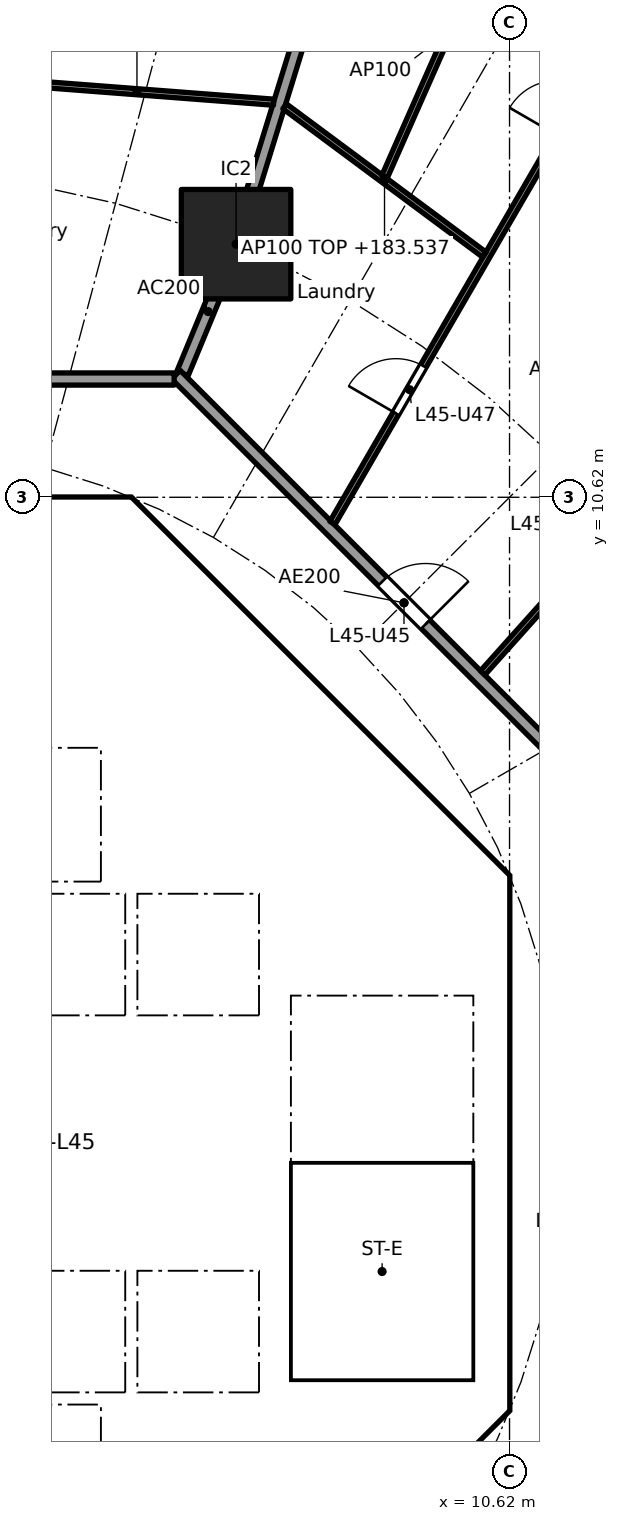
"""IFC4 building model, lengths in metres.
Left out: names, types, materials, properties, quantities, classifications, styles, units other than length and angle.
Written with IfcOpenShell. Run it as: python <this file> out.ifc"""

import sys

from ifc_helpers import new_model, si_unit, direction, frame, frame_2d, origin, origin_2d, place, context, subcontext, project, spatial, polyline, rectangle, outline, extrude, element, fill, save


model = new_model("IFC4")
c1 = context("Model", 3, precision=1e-05, world=origin(), true_north=direction((0.0, 1.0)))
c2 = subcontext(c1, "Body", "Model", "MODEL_VIEW")
j1 = project(units=[si_unit("LENGTHUNIT", "METRE"), si_unit("PLANEANGLEUNIT", "RADIAN")], contexts=[c1])
p1 = place(None, origin())
s1 = spatial("IfcSite", under=j1, at=p1, CompositionType="ELEMENT")
p2 = place(p1, origin())
s2 = spatial("IfcBuilding", under=s1, at=p2, CompositionType="ELEMENT")
p3 = place(p2, frame((0.0, 0.0, 180.7)))
s3 = spatial("IfcBuildingStorey", under=s2, at=p3, CompositionType="ELEMENT", Elevation=180.7)
p4 = place(p3, frame((6.123, 14.782, 0.0), z_axis=(0.0, 0.0, 1.0), x_axis=(1.0, 0.0, 0.0)))
e1 = element("IfcColumn", 1, at=p4, inside=s3, PredefinedType="COLUMN", context=c2, shape_type="SweptSolid", body=[
    extrude(rectangle(XDim=1.8, YDim=1.8, at=origin_2d()), origin(), (0.0, 0.0, 1.0), 3.7),
])
p5 = place(p3, frame((9.988, 4.613, 0.0), z_axis=(0.0, 0.0, 1.0), x_axis=(-0.707106781187, 0.707106781187, 0.0)))
e2 = element("IfcWall", 2, at=p5, inside=s3, PredefinedType="SHEAR", context=c2, shape_type="SweptSolid", body=[
    extrude(rectangle(XDim=7.602, YDim=0.6, at=frame_2d((3.801, 0.0))), origin(), (0.0, 0.0, 1.0), 3.44),
])
p6 = place(p5, frame((3.201, 0.0, 0.0)))
e3 = element("IfcOpeningElement", 3, at=p6, cuts=e2, PredefinedType="OPENING", context=c2, shape_type="SweptSolid", body=[
    extrude(rectangle(XDim=1.2, YDim=2.1, at=frame_2d((0.6, 1.05))), frame((0.0, 0.31, 0.0), z_axis=(0.0, -1.0, 0.0), x_axis=(1.0, 0.0, 0.0)), (0.0, 0.0, 1.0), 0.62),
])
p7 = place(p3, frame((4.613, -9.988, 0.0), z_axis=(0.0, 0.0, 1.0), x_axis=(0.707106781187, 0.707106781187, 0.0)))
e4 = element("IfcWall", 4, at=p7, inside=s3, PredefinedType="SHEAR", context=c2, shape_type="SweptSolid", body=[
    extrude(rectangle(XDim=7.602, YDim=0.6, at=frame_2d((3.801, 0.0))), origin(), (0.0, 0.0, 1.0), 3.44),
])
p8 = place(p7, frame((3.201, 0.0, 0.0)))
e5 = element("IfcOpeningElement", 5, at=p8, cuts=e4, PredefinedType="OPENING", context=c2, shape_type="SweptSolid", body=[
    extrude(rectangle(XDim=1.2, YDim=2.1, at=frame_2d((0.6, 1.05))), frame((0.0, 0.31, 0.0), z_axis=(0.0, -1.0, 0.0), x_axis=(1.0, 0.0, 0.0)), (0.0, 0.0, 1.0), 0.62),
])
p9 = place(p3, frame((4.0, 4.3, 0.0), z_axis=(0.0, 0.0, 1.0), x_axis=(0.0, 1.0, 0.0)))
e6 = element("IfcWall", 6, at=p9, inside=s3, PredefinedType="SOLIDWALL", context=c2, shape_type="SweptSolid", body=[
    extrude(rectangle(XDim=2.2, YDim=0.2, at=frame_2d((1.1, 0.0))), origin(), (0.0, 0.0, 1.0), 3.44),
])
p10 = place(p9, frame((0.55, 0.0, 0.0)))
e7 = element("IfcOpeningElement", 7, at=p10, cuts=e6, PredefinedType="OPENING", context=c2, shape_type="SweptSolid", body=[
    extrude(rectangle(XDim=1.1, YDim=2.1, at=frame_2d((0.55, 1.05))), frame((0.0, 0.11, 0.0), z_axis=(0.0, -1.0, 0.0), x_axis=(1.0, 0.0, 0.0)), (0.0, 0.0, 1.0), 0.22),
])
p11 = place(p3, frame((-6.7, 2.0, 0.0), z_axis=(0.0, 0.0, 1.0), x_axis=(1.0, 0.0, 0.0)))
e8 = element("IfcWall", 8, at=p11, inside=s3, PredefinedType="SOLIDWALL", context=c2, shape_type="SweptSolid", body=[
    extrude(rectangle(XDim=13.4, YDim=0.2, at=frame_2d((6.7, 0.0))), origin(), (0.0, 0.0, 1.0), 3.44),
])
p12 = place(p11, frame((7.25, 0.0, 0.0)))
e9 = element("IfcOpeningElement", 9, at=p12, cuts=e8, PredefinedType="OPENING", context=c2, shape_type="SweptSolid", body=[
    extrude(rectangle(XDim=1.1, YDim=2.1, at=frame_2d((0.55, 1.05))), frame((0.0, 0.11, 0.0), z_axis=(0.0, -1.0, 0.0), x_axis=(1.0, 0.0, 0.0)), (0.0, 0.0, 1.0), 0.22),
])
p13 = place(p11, frame((9.45, 0.0, 0.0)))
e10 = element("IfcOpeningElement", 10, at=p13, cuts=e8, PredefinedType="OPENING", context=c2, shape_type="SweptSolid", body=[
    extrude(rectangle(XDim=1.1, YDim=2.1, at=frame_2d((0.55, 1.05))), frame((0.0, 0.11, 0.0), z_axis=(0.0, -1.0, 0.0), x_axis=(1.0, 0.0, 0.0)), (0.0, 0.0, 1.0), 0.22),
])
p14 = place(p11, frame((0.75, 0.0, 0.0)))
e11 = element("IfcOpeningElement", 11, at=p14, cuts=e8, PredefinedType="OPENING", context=c2, shape_type="SweptSolid", body=[
    extrude(rectangle(XDim=0.9, YDim=2.1, at=frame_2d((0.45, 1.05))), frame((0.0, 0.11, 0.0), z_axis=(0.0, -1.0, 0.0), x_axis=(1.0, 0.0, 0.0)), (0.0, 0.0, 1.0), 0.22),
])
p15 = place(p11, frame((4.05, 0.0, 0.0)))
e12 = element("IfcOpeningElement", 12, at=p15, cuts=e8, PredefinedType="OPENING", context=c2, shape_type="SweptSolid", body=[
    extrude(rectangle(XDim=0.9, YDim=2.1, at=frame_2d((0.45, 1.05))), frame((0.0, 0.11, 0.0), z_axis=(0.0, -1.0, 0.0), x_axis=(1.0, 0.0, 0.0)), (0.0, 0.0, 1.0), 0.22),
])
p16 = place(p3, frame((6.7, 4.0, 0.0), z_axis=(0.0, 0.0, 1.0), x_axis=(1.0, 0.0, 0.0)))
e13 = element("IfcWall", 13, at=p16, inside=s3, PredefinedType="SOLIDWALL", context=c2, shape_type="SweptSolid", body=[
    extrude(rectangle(XDim=3.325, YDim=0.2, at=frame_2d((1.662, 0.0))), origin(), (0.0, 0.0, 1.0), 3.44),
])
p17 = place(p16, frame((1.25, 0.0, 0.0)))
e14 = element("IfcOpeningElement", 14, at=p17, cuts=e13, PredefinedType="OPENING", context=c2, shape_type="SweptSolid", body=[
    extrude(rectangle(XDim=1.1, YDim=2.1, at=frame_2d((0.55, 1.05))), frame((0.0, 0.11, 0.0), z_axis=(0.0, -1.0, 0.0), x_axis=(1.0, 0.0, 0.0)), (0.0, 0.0, 1.0), 0.22),
])
p18 = place(p3, frame((4.0, 7.025, 0.0), z_axis=(0.0, 0.0, 1.0), x_axis=(0.0, 1.0, 0.0)))
e15 = element("IfcWall", 15, at=p18, inside=s3, PredefinedType="SOLIDWALL", context=c2, shape_type="SweptSolid", body=[
    extrude(rectangle(XDim=3.0, YDim=0.2, at=frame_2d((1.5, 0.0))), origin(), (0.0, 0.0, 1.0), 3.44),
])
p19 = place(p18, frame((0.925, 0.0, 0.0)))
e16 = element("IfcOpeningElement", 16, at=p19, cuts=e15, PredefinedType="OPENING", context=c2, shape_type="SweptSolid", body=[
    extrude(rectangle(XDim=1.1, YDim=2.1, at=frame_2d((0.55, 1.05))), frame((0.0, 0.11, 0.0), z_axis=(0.0, -1.0, 0.0), x_axis=(1.0, 0.0, 0.0)), (0.0, 0.0, 1.0), 0.22),
])
p20 = place(p3, frame((4.0, -6.5, 0.0), z_axis=(0.0, 0.0, 1.0), x_axis=(0.0, 1.0, 0.0)))
e17 = element("IfcWall", 17, at=p20, inside=s3, PredefinedType="SOLIDWALL", context=c2, shape_type="SweptSolid", body=[
    extrude(rectangle(XDim=2.2, YDim=0.2, at=frame_2d((1.1, 0.0))), origin(), (0.0, 0.0, 1.0), 3.44),
])
p21 = place(p20, frame((0.55, 0.0, 0.0)))
e18 = element("IfcOpeningElement", 18, at=p21, cuts=e17, PredefinedType="OPENING", context=c2, shape_type="SweptSolid", body=[
    extrude(rectangle(XDim=1.1, YDim=2.1, at=frame_2d((0.55, 1.05))), frame((0.0, 0.11, 0.0), z_axis=(0.0, -1.0, 0.0), x_axis=(1.0, 0.0, 0.0)), (0.0, 0.0, 1.0), 0.22),
])
p22 = place(p3, frame((-6.7, -2.0, 0.0), z_axis=(0.0, 0.0, 1.0), x_axis=(1.0, 0.0, 0.0)))
e19 = element("IfcWall", 19, at=p22, inside=s3, PredefinedType="SOLIDWALL", context=c2, shape_type="SweptSolid", body=[
    extrude(rectangle(XDim=13.4, YDim=0.2, at=frame_2d((6.7, 0.0))), origin(), (0.0, 0.0, 1.0), 3.44),
])
p23 = place(p22, frame((5.05, 0.0, 0.0)))
e20 = element("IfcOpeningElement", 20, at=p23, cuts=e19, PredefinedType="OPENING", context=c2, shape_type="SweptSolid", body=[
    extrude(rectangle(XDim=1.1, YDim=2.1, at=frame_2d((0.55, 1.05))), frame((0.0, 0.11, 0.0), z_axis=(0.0, -1.0, 0.0), x_axis=(1.0, 0.0, 0.0)), (0.0, 0.0, 1.0), 0.22),
])
p24 = place(p22, frame((7.25, 0.0, 0.0)))
e21 = element("IfcOpeningElement", 21, at=p24, cuts=e19, PredefinedType="OPENING", context=c2, shape_type="SweptSolid", body=[
    extrude(rectangle(XDim=1.1, YDim=2.1, at=frame_2d((0.55, 1.05))), frame((0.0, 0.11, 0.0), z_axis=(0.0, -1.0, 0.0), x_axis=(1.0, 0.0, 0.0)), (0.0, 0.0, 1.0), 0.22),
])
p25 = place(p22, frame((1.85, 0.0, 0.0)))
e22 = element("IfcOpeningElement", 22, at=p25, cuts=e19, PredefinedType="OPENING", context=c2, shape_type="SweptSolid", body=[
    extrude(rectangle(XDim=0.9, YDim=2.1, at=frame_2d((0.45, 1.05))), frame((0.0, 0.11, 0.0), z_axis=(0.0, -1.0, 0.0), x_axis=(1.0, 0.0, 0.0)), (0.0, 0.0, 1.0), 0.22),
])
p26 = place(p3, origin())
e23 = element("IfcWall", 23, at=p26, inside=s3, PredefinedType="SHEAR", context=c2, shape_type="SweptSolid", body=[
    extrude(outline(polyline([(-4.152, 10.025), (-4.401, 9.776), (-4.825, 10.2), (-4.401, 10.625), (4.401, 10.625), (4.825, 10.2), (4.401, 9.776), (4.152, 10.025), (-4.152, 10.025)])), origin(), (0.0, 0.0, 1.0), 3.44),
])
p27 = place(p3, origin())
e24 = element("IfcWall", 24, at=p27, inside=s3, PredefinedType="SHEAR", context=c2, shape_type="SweptSolid", body=[
    extrude(outline(polyline([(9.776, -4.401), (10.025, -4.152), (10.025, -3.801), (10.025, 4.152), (9.776, 4.401), (10.2, 4.825), (10.625, 4.401), (10.625, -4.401), (10.2, -4.825), (9.776, -4.401)])), origin(), (0.0, 0.0, 1.0), 3.44),
])
p28 = place(p3, origin())
e25 = element("IfcWall", 25, at=p28, inside=s3, PredefinedType="SOLIDWALL", context=c2, shape_type="SweptSolid", body=[
    extrude(outline(polyline([(-6.7, 4.3), (6.7, 4.3), (6.7, 2.1), (6.5, 2.1), (6.5, 4.1), (4.5, 4.1), (4.5, 2.1), (4.3, 2.1), (4.3, 4.1), (2.3, 4.1), (2.3, 2.1), (2.1, 2.1), (2.1, 4.1), (0.1, 4.1), (0.1, 2.1), (-0.1, 2.1), (-0.1, 4.1), (-4.3, 4.1), (-4.3, 2.1), (-4.5, 2.1), (-4.5, 4.1), (-6.5, 4.1), (-6.5, 2.1), (-6.7, 2.1), (-6.7, 4.3)])), origin(), (0.0, 0.0, 1.0), 3.44),
])
p29 = place(p3, origin())
e26 = element("IfcWall", 26, at=p29, inside=s3, PredefinedType="SOLIDWALL", context=c2, shape_type="SweptSolid", body=[
    extrude(outline(polyline([(-6.7, -2.1), (-6.5, -2.1), (-6.5, -4.1), (-2.3, -4.1), (-2.3, -2.1), (-2.1, -2.1), (-2.1, -4.1), (-0.1, -4.1), (-0.1, -2.1), (0.1, -2.1), (0.1, -4.1), (2.1, -4.1), (2.1, -2.1), (2.3, -2.1), (2.3, -4.1), (4.3, -4.1), (4.3, -2.1), (4.5, -2.1), (4.5, -4.1), (6.5, -4.1), (6.5, -2.1), (6.7, -2.1), (6.7, -4.3), (-6.7, -4.3), (-6.7, -2.1)])), origin(), (0.0, 0.0, 1.0), 3.44),
])
p30 = place(p3, origin())
e27 = element("IfcWall", 27, at=p30, inside=s3, PredefinedType="SOLIDWALL", context=c2, shape_type="SweptSolid", body=[
    extrude(outline(polyline([(4.1, 6.5), (-4.1, 6.5), (-4.1, 7.025), (4.1, 7.025), (4.1, 6.5)])), origin(), (0.0, 0.0, 1.0), 3.44),
])
p31 = place(p3, origin())
e28 = element("IfcWall", 28, at=p31, inside=s3, PredefinedType="SOLIDWALL", context=c2, shape_type="SweptSolid", body=[
    extrude(outline(polyline([(7.025, -3.9), (6.7, -3.9), (6.7, 3.9), (7.025, 3.9), (7.025, -3.9)])), origin(), (0.0, 0.0, 1.0), 3.44),
])
p32 = place(p3, origin())
e29 = element("IfcWall", 29, at=p32, inside=s3, PredefinedType="SOLIDWALL", context=c2, shape_type="SweptSolid", body=[
    extrude(outline(polyline([(10.025, -4.1), (6.7, -4.1), (6.7, -3.9), (10.025, -3.9), (10.025, -4.1)])), origin(), (0.0, 0.0, 1.0), 3.44),
])
p33 = place(p3, frame((5.243, 12.657, 0.0), z_axis=(0.0, 0.0, 1.0), x_axis=(0.382747093259, 0.923853160736, 0.0)))
e30 = element("IfcWall", 30, at=p33, inside=s3, PredefinedType="PARTITIONING", context=c2, shape_type="SweptSolid", body=[
    extrude(rectangle(XDim=2.2, YDim=0.2, at=frame_2d((1.1, 0.0))), origin(), (0.0, 0.0, 1.0), 3.44),
])
p34 = place(p3, frame((6.138, 14.83, 0.0), z_axis=(0.0, 0.0, 1.0), x_axis=(0.294818517221, 0.955553264818, 0.0)))
e31 = element("IfcWall", 31, at=p34, inside=s3, PredefinedType="PARTITIONING", context=c2, shape_type="SweptSolid", body=[
    extrude(rectangle(XDim=12.619, YDim=0.2, at=frame_2d((6.31, 0.0))), origin(), (0.0, 0.0, 1.0), 2.837),
])
p35 = place(p3, frame((12.635, 5.134, 0.0), z_axis=(0.0, 0.0, 1.0), x_axis=(-0.707106781187, 0.707106781187, 0.0)))
e32 = element("IfcWall", 32, at=p35, inside=s3, PredefinedType="PARTITIONING", context=c2, shape_type="SweptSolid", body=[
    extrude(rectangle(XDim=10.609, YDim=0.2, at=frame_2d((5.305, 0.0))), origin(), (0.0, 0.0, 1.0), 3.44),
])
p36 = place(p35, frame((4.804, 0.0, 0.0)))
e33 = element("IfcOpeningElement", 33, at=p36, cuts=e32, PredefinedType="OPENING", context=c2, shape_type="SweptSolid", body=[
    extrude(rectangle(XDim=1.0, YDim=2.1, at=frame_2d((0.5, 1.05))), frame((0.0, 0.11, 0.0), z_axis=(0.0, -1.0, 0.0), x_axis=(1.0, 0.0, 0.0)), (0.0, 0.0, 1.0), 0.22),
])
p37 = place(p3, frame((5.104, 12.565, 0.0), z_axis=(0.0, 0.0, 1.0), x_axis=(-1.0, 0.0, 0.0)))
e34 = element("IfcWall", 34, at=p37, inside=s3, PredefinedType="PARTITIONING", context=c2, shape_type="SweptSolid", body=[
    extrude(rectangle(XDim=10.409, YDim=0.2, at=frame_2d((5.205, 0.0))), origin(), (0.0, 0.0, 1.0), 3.44),
])
p38 = place(p37, frame((6.339, 0.0, 0.0)))
e35 = element("IfcOpeningElement", 35, at=p38, cuts=e34, PredefinedType="OPENING", context=c2, shape_type="SweptSolid", body=[
    extrude(rectangle(XDim=1.0, YDim=2.1, at=frame_2d((0.5, 1.05))), frame((0.0, 0.11, 0.0), z_axis=(0.0, -1.0, 0.0), x_axis=(1.0, 0.0, 0.0)), (0.0, 0.0, 1.0), 0.22),
])
p39 = place(p3, frame((10.178, 7.732, 0.0), z_axis=(0.0, 0.0, 1.0), x_axis=(0.667280084362, 0.744806880348, 0.0)))
e36 = element("IfcWall", 36, at=p39, inside=s3, PredefinedType="PARTITIONING", context=c2, shape_type="SweptSolid", body=[
    extrude(rectangle(XDim=10.572, YDim=0.1, at=frame_2d((5.286, 0.0))), origin(), (0.0, 0.0, 1.0), 2.756),
])
p40 = place(p39, frame((2.07, 0.0, 0.0)))
e37 = element("IfcOpeningElement", 37, at=p40, cuts=e36, PredefinedType="OPENING", context=c2, shape_type="SweptSolid", body=[
    extrude(rectangle(XDim=0.9, YDim=2.1, at=frame_2d((0.45, 1.05))), frame((0.0, 0.06, 0.0), z_axis=(0.0, -1.0, 0.0), x_axis=(1.0, 0.0, 0.0)), (0.0, 0.0, 1.0), 0.12),
])
p41 = place(p39, frame((7.331, 0.0, 0.0)))
e38 = element("IfcOpeningElement", 38, at=p41, cuts=e36, PredefinedType="OPENING", context=c2, shape_type="SweptSolid", body=[
    extrude(rectangle(XDim=0.9, YDim=2.1, at=frame_2d((0.45, 1.05))), frame((0.0, 0.06, 0.0), z_axis=(0.0, -1.0, 0.0), x_axis=(1.0, 0.0, 0.0)), (0.0, 0.0, 1.0), 0.12),
])
p42 = place(p3, frame((7.708, 10.198, 0.0), z_axis=(0.0, 0.0, 1.0), x_axis=(0.501305229744, 0.865270516446, 0.0)))
e39 = element("IfcWall", 39, at=p42, inside=s3, PredefinedType="PARTITIONING", context=c2, shape_type="SweptSolid", body=[
    extrude(rectangle(XDim=16.064, YDim=0.1, at=frame_2d((8.032, 0.0))), origin(), (0.0, 0.0, 1.0), 2.756),
])
p43 = place(p42, frame((2.082, 0.0, 0.0)))
e40 = element("IfcOpeningElement", 40, at=p43, cuts=e39, PredefinedType="OPENING", context=c2, shape_type="SweptSolid", body=[
    extrude(rectangle(XDim=0.9, YDim=2.1, at=frame_2d((0.45, 1.05))), frame((0.0, 0.06, 0.0), z_axis=(0.0, -1.0, 0.0), x_axis=(1.0, 0.0, 0.0)), (0.0, 0.0, 1.0), 0.12),
])
p44 = place(p42, frame((7.369, 0.0, 0.0)))
e41 = element("IfcOpeningElement", 41, at=p44, cuts=e39, PredefinedType="OPENING", context=c2, shape_type="SweptSolid", body=[
    extrude(rectangle(XDim=0.9, YDim=2.1, at=frame_2d((0.45, 1.05))), frame((0.0, 0.06, 0.0), z_axis=(0.0, -1.0, 0.0), x_axis=(1.0, 0.0, 0.0)), (0.0, 0.0, 1.0), 0.12),
])
p45 = place(p42, frame((12.869, 0.0, 0.0)))
e42 = element("IfcOpeningElement", 42, at=p45, cuts=e39, PredefinedType="OPENING", context=c2, shape_type="SweptSolid", body=[
    extrude(rectangle(XDim=0.9, YDim=2.1, at=frame_2d((0.45, 1.05))), frame((0.0, 0.06, 0.0), z_axis=(0.0, -1.0, 0.0), x_axis=(1.0, 0.0, 0.0)), (0.0, 0.0, 1.0), 0.12),
])
p46 = place(p3, frame((10.207, 14.61, 0.0), z_axis=(0.0, 0.0, 1.0), x_axis=(-0.802769141821, 0.596289950394, 0.0)))
e43 = element("IfcWall", 43, at=p46, inside=s3, PredefinedType="PARTITIONING", context=c2, shape_type="SweptSolid", body=[
    extrude(rectangle(XDim=4.092, YDim=0.1, at=frame_2d((2.046, 0.0))), origin(), (0.0, 0.0, 1.0), 2.837),
])
p47 = place(p3, frame((8.564, 15.89, 0.0), z_axis=(0.0, 0.0, 1.0), x_axis=(0.404011266873, 0.914754008595, 0.0)))
e44 = element("IfcWall", 44, at=p47, inside=s3, PredefinedType="PARTITIONING", context=c2, shape_type="SweptSolid", body=[
    extrude(rectangle(XDim=5.199, YDim=0.1, at=frame_2d((2.6, 0.0))), origin(), (0.0, 0.0, 1.0), 3.44),
])
p48 = place(p3, frame((6.741, 17.117, 0.0), z_axis=(0.0, 0.0, 1.0), x_axis=(-0.997078320723, 0.076386008825, 0.0)))
e45 = element("IfcWall", 45, at=p48, inside=s3, PredefinedType="PARTITIONING", context=c2, shape_type="SweptSolid", body=[
    extrude(rectangle(XDim=4.51, YDim=0.1, at=frame_2d((2.255, 0.0))), origin(), (0.0, 0.0, 1.0), 2.837),
])
p49 = place(p13, origin())
e46 = element("IfcDoor", 46, at=p49, inside=s3, OperationType="DOUBLE_DOOR_SLIDING", PredefinedType="DOOR", context=c2, shape_type="SweptSolid", body=[
    extrude(rectangle(XDim=1.1, YDim=2.1, at=frame_2d((0.55, 1.05))), frame((0.0, 0.025, 0.0), z_axis=(0.0, -1.0, 0.0), x_axis=(1.0, 0.0, 0.0)), (0.0, 0.0, 1.0), 0.05),
])
fill(e10, e46)
p50 = place(p10, origin())
e47 = element("IfcDoor", 47, at=p50, inside=s3, OperationType="DOUBLE_DOOR_SLIDING", PredefinedType="DOOR", context=c2, shape_type="SweptSolid", body=[
    extrude(rectangle(XDim=1.1, YDim=2.1, at=frame_2d((0.55, 1.05))), frame((0.0, 0.025, 0.0), z_axis=(0.0, -1.0, 0.0), x_axis=(1.0, 0.0, 0.0)), (0.0, 0.0, 1.0), 0.05),
])
fill(e7, e47)
p51 = place(p21, origin())
e48 = element("IfcDoor", 48, at=p51, inside=s3, OperationType="DOUBLE_DOOR_SLIDING", PredefinedType="DOOR", context=c2, shape_type="SweptSolid", body=[
    extrude(rectangle(XDim=1.1, YDim=2.1, at=frame_2d((0.55, 1.05))), frame((0.0, 0.025, 0.0), z_axis=(0.0, -1.0, 0.0), x_axis=(1.0, 0.0, 0.0)), (0.0, 0.0, 1.0), 0.05),
])
fill(e18, e48)
p52 = place(p17, frame((1.1, 0.0, 0.0), x_axis=(-1.0, 0.0, 0.0)))
e49 = element("IfcDoor", 49, at=p52, inside=s3, OperationType="SINGLE_SWING_RIGHT", PredefinedType="DOOR", context=c2, shape_type="SweptSolid", body=[
    extrude(rectangle(XDim=1.1, YDim=2.1, at=frame_2d((0.55, 1.05))), frame((0.0, 0.025, 0.0), z_axis=(0.0, -1.0, 0.0), x_axis=(1.0, 0.0, 0.0)), (0.0, 0.0, 1.0), 0.05),
])
fill(e14, e49)
p53 = place(p19, origin())
e50 = element("IfcDoor", 50, at=p53, inside=s3, OperationType="SINGLE_SWING_LEFT", PredefinedType="DOOR", context=c2, shape_type="SweptSolid", body=[
    extrude(rectangle(XDim=1.1, YDim=2.1, at=frame_2d((0.55, 1.05))), frame((0.0, 0.025, 0.0), z_axis=(0.0, -1.0, 0.0), x_axis=(1.0, 0.0, 0.0)), (0.0, 0.0, 1.0), 0.05),
])
fill(e16, e50)
p54 = place(p6, origin())
e51 = element("IfcDoor", 51, at=p54, inside=s3, OperationType="SINGLE_SWING_LEFT", PredefinedType="DOOR", context=c2, shape_type="SweptSolid", body=[
    extrude(rectangle(XDim=1.2, YDim=2.1, at=frame_2d((0.6, 1.05))), frame((0.0, 0.025, 0.0), z_axis=(0.0, -1.0, 0.0), x_axis=(1.0, 0.0, 0.0)), (0.0, 0.0, 1.0), 0.05),
])
fill(e3, e51)
p55 = place(p36, frame((1.0, 0.0, 0.0), x_axis=(-1.0, 0.0, 0.0)))
e52 = element("IfcDoor", 52, at=p55, inside=s3, OperationType="SINGLE_SWING_RIGHT", PredefinedType="DOOR", context=c2, shape_type="SweptSolid", body=[
    extrude(rectangle(XDim=1.0, YDim=2.1, at=frame_2d((0.5, 1.05))), frame((0.0, 0.025, 0.0), z_axis=(0.0, -1.0, 0.0), x_axis=(1.0, 0.0, 0.0)), (0.0, 0.0, 1.0), 0.05),
])
fill(e33, e52)
p56 = place(p43, origin())
e53 = element("IfcDoor", 53, at=p56, inside=s3, OperationType="SINGLE_SWING_LEFT", PredefinedType="DOOR", context=c2, shape_type="SweptSolid", body=[
    extrude(rectangle(XDim=0.9, YDim=2.1, at=frame_2d((0.45, 1.05))), frame((0.0, 0.025, 0.0), z_axis=(0.0, -1.0, 0.0), x_axis=(1.0, 0.0, 0.0)), (0.0, 0.0, 1.0), 0.05),
])
fill(e40, e53)
save(model, sys.argv[1])
